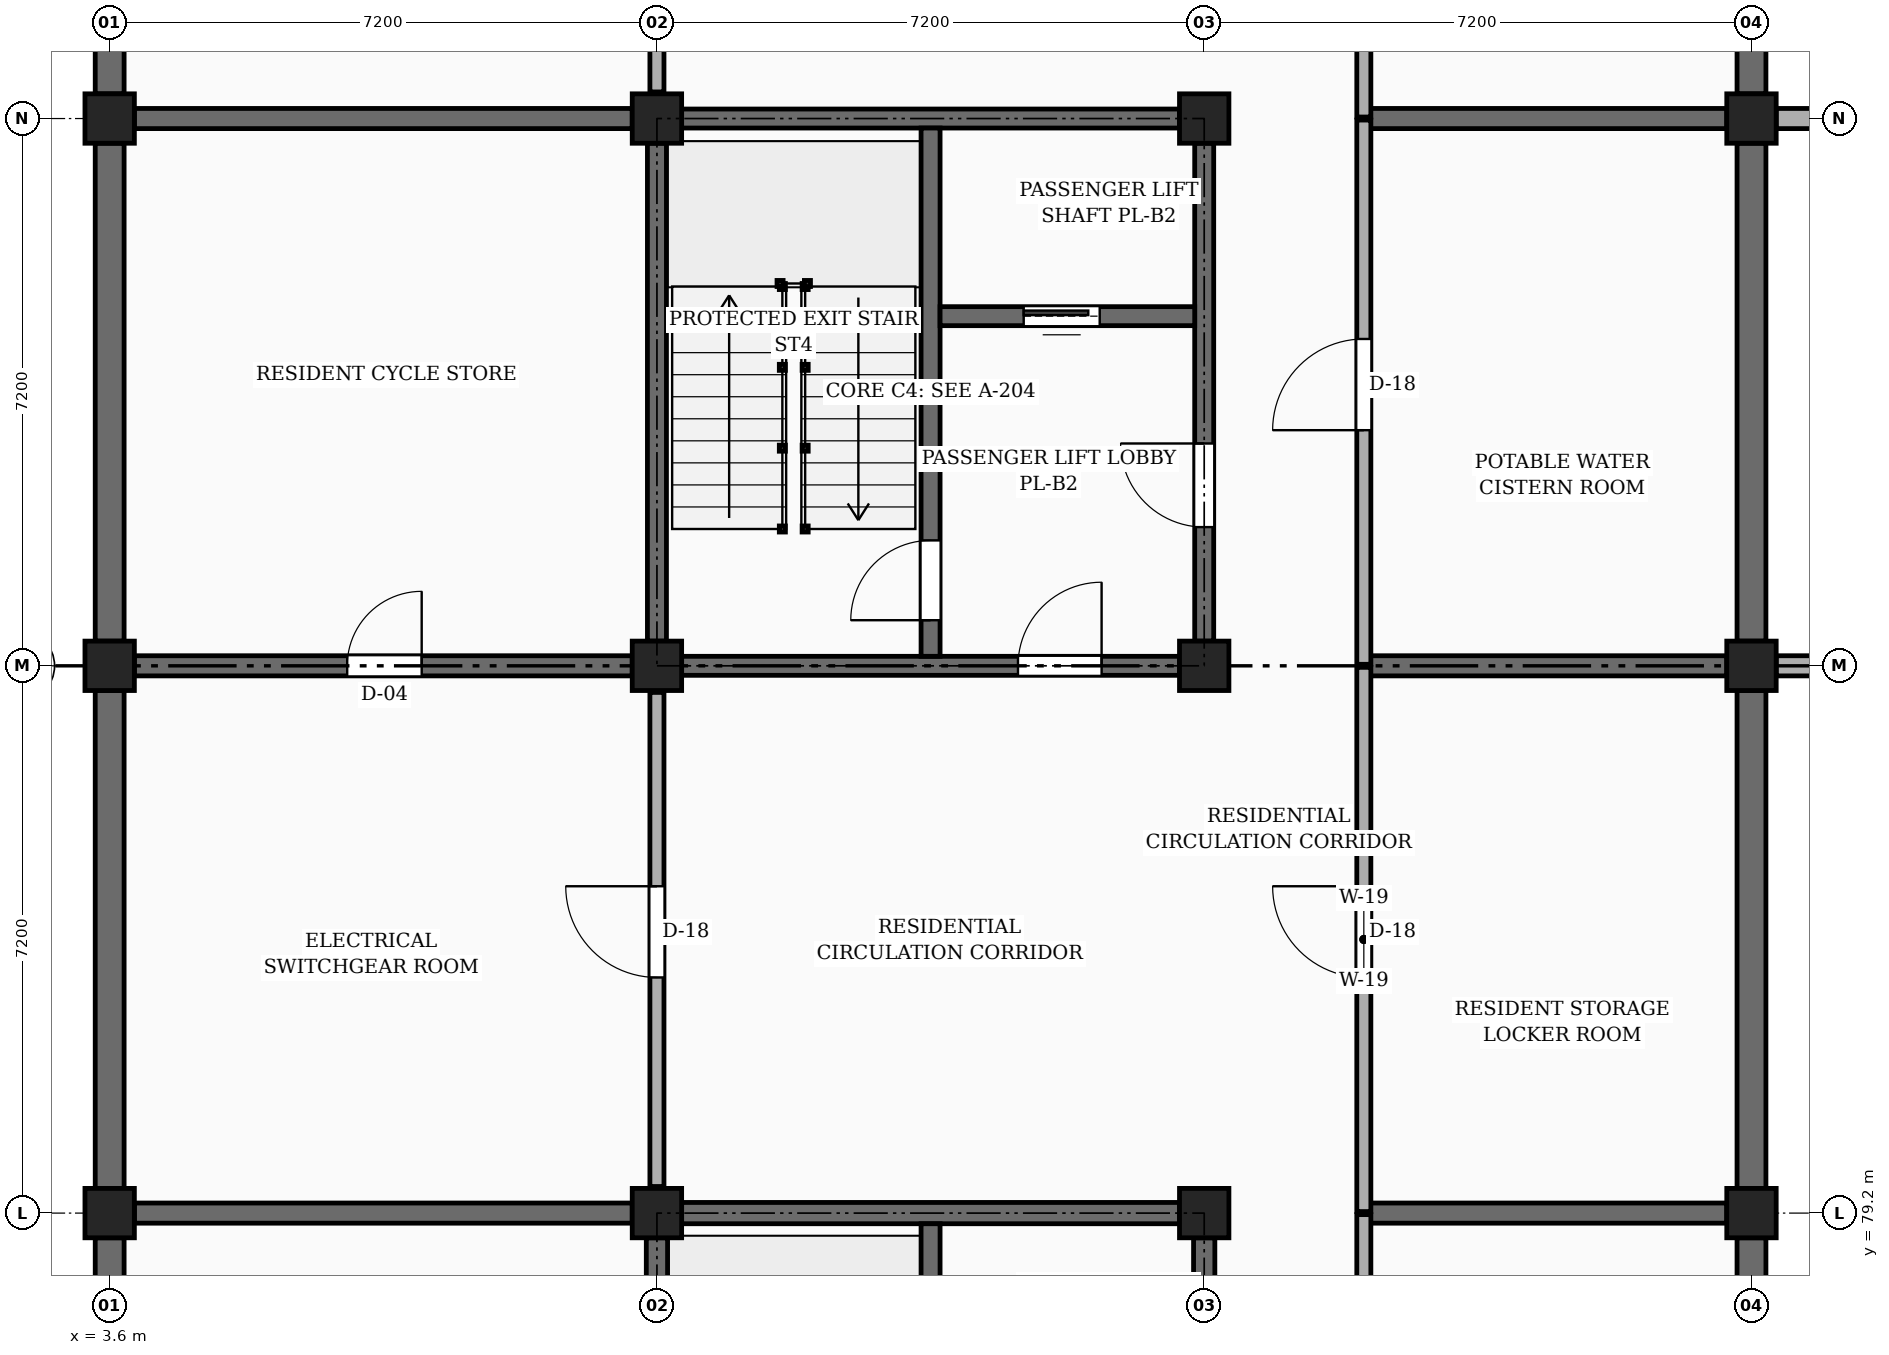
"""IFC4 building model, lengths in metres.
Left out: names, types, materials, properties, quantities, classifications, styles, units other than length and angle.
Written with IfcOpenShell. Run it as: python <this file> out.ifc"""

import sys

from ifc_helpers import new_model, si_unit, direction, frame, frame_2d, origin, origin_2d, place, context, subcontext, project, spatial, rectangle, extrude, element, fill, save


model = new_model("IFC4")
c1 = context("Model", 3, precision=1e-05, world=origin(), true_north=direction((0.0, 1.0)))
c2 = subcontext(c1, "Body", "Model", "MODEL_VIEW")
j1 = project(units=[si_unit("LENGTHUNIT", "METRE"), si_unit("PLANEANGLEUNIT", "RADIAN")], contexts=[c1])
p1 = place(None, origin())
s1 = spatial("IfcSite", under=j1, at=p1, CompositionType="ELEMENT")
p2 = place(p1, origin())
s2 = spatial("IfcBuilding", under=s1, at=p2, CompositionType="ELEMENT")
p3 = place(p2, frame((0.0, 0.0, -4.2)))
s3 = spatial("IfcBuildingStorey", under=s2, at=p3, CompositionType="ELEMENT", Elevation=-4.2)
for number, where, z_axis, x_axis in (
    (1, (25.525, 86.4, 0.0), (0.0, 0.0, 1.0), (1.0, 0.0, 0.0)),
    (2, (27.39, 93.6, 0.0), (0.0, 0.0, 1.0), (-1.0, 0.0, 0.0)),
):
    element("IfcWall", number, at=place(p3, frame(where, z_axis=z_axis, x_axis=x_axis)), inside=s3, PredefinedType="SOLIDWALL", context=c2, shape_type="SweptSolid", body=[
        extrude(rectangle(XDim=1.865, YDim=0.265, at=frame_2d((0.933, 0.0))), origin(), (0.0, 0.0, 1.0), 4.12),
    ])
for number, where, z_axis, x_axis in (
    (3, (3.6, 79.2, 0.0), (0.0, 0.0, 1.0), (1.0, 0.0, 0.0)),
    (4, (3.6, 86.4, 0.0), (0.0, 0.0, 1.0), (1.0, 0.0, 0.0)),
    (5, (3.6, 93.6, 0.0), (0.0, 0.0, 1.0), (1.0, 0.0, 0.0)),
    (6, (10.8, 79.2, 0.0), (0.0, 0.0, 1.0), (1.0, 0.0, 0.0)),
    (7, (10.8, 86.4, 0.0), (0.0, 0.0, 1.0), (1.0, 0.0, 0.0)),
    (8, (10.8, 93.6, 0.0), (0.0, 0.0, 1.0), (1.0, 0.0, 0.0)),
    (9, (18.0, 79.2, 0.0), (0.0, 0.0, 1.0), (1.0, 0.0, 0.0)),
    (10, (18.0, 86.4, 0.0), (0.0, 0.0, 1.0), (1.0, 0.0, 0.0)),
    (11, (18.0, 93.6, 0.0), (0.0, 0.0, 1.0), (1.0, 0.0, 0.0)),
    (12, (25.2, 79.2, 0.0), (0.0, 0.0, 1.0), (1.0, 0.0, 0.0)),
    (13, (25.2, 86.4, 0.0), (0.0, 0.0, 1.0), (1.0, 0.0, 0.0)),
    (14, (25.2, 93.6, 0.0), (0.0, 0.0, 1.0), (1.0, 0.0, 0.0)),
):
    element("IfcColumn", number, at=place(p3, frame(where, z_axis=z_axis, x_axis=x_axis)), inside=s3, PredefinedType="COLUMN", context=c2, shape_type="SweptSolid", body=[
        extrude(rectangle(XDim=0.65, YDim=0.65, at=origin_2d()), origin(), (0.0, 0.0, 1.0), 4.2),
    ])
for number, where, z_axis, x_axis in (
    (15, (25.2, 72.325, 0.0), (0.0, 0.0, 1.0), (0.0, 1.0, 0.0)),
    (16, (3.6, 78.875, 0.0), (0.0, 0.0, 1.0), (0.0, -1.0, 0.0)),
    (17, (25.2, 79.525, 0.0), (0.0, 0.0, 1.0), (0.0, 1.0, 0.0)),
    (18, (3.6, 86.075, 0.0), (0.0, 0.0, 1.0), (0.0, -1.0, 0.0)),
):
    element("IfcWall", number, at=place(p3, frame(where, z_axis=z_axis, x_axis=x_axis)), inside=s3, PredefinedType="USERDEFINED", context=c2, shape_type="SweptSolid", body=[
        extrude(rectangle(XDim=6.55, YDim=0.38, at=frame_2d((3.275, 0.0))), origin(), (0.0, 0.0, 1.0), 3.03),
    ])
for number, where, z_axis, x_axis in (
    (19, (25.2, 86.725, 0.0), (0.0, 0.0, 1.0), (0.0, 1.0, 0.0)),
    (20, (3.6, 93.275, 0.0), (0.0, 0.0, 1.0), (0.0, -1.0, 0.0)),
):
    element("IfcWall", number, at=place(p3, frame(where, z_axis=z_axis, x_axis=x_axis)), inside=s3, PredefinedType="USERDEFINED", context=c2, shape_type="SweptSolid", body=[
        extrude(rectangle(XDim=6.55, YDim=0.38, at=frame_2d((3.275, 0.0))), origin(), (0.0, 0.0, 1.0), 3.03),
    ])
for number, where, z_axis, x_axis in (
    (21, (25.2, 93.925, 0.0), (0.0, 0.0, 1.0), (0.0, 1.0, 0.0)),
    (22, (3.6, 100.475, 0.0), (0.0, 0.0, 1.0), (0.0, -1.0, 0.0)),
):
    element("IfcWall", number, at=place(p3, frame(where, z_axis=z_axis, x_axis=x_axis)), inside=s3, PredefinedType="USERDEFINED", context=c2, shape_type="SweptSolid", body=[
        extrude(rectangle(XDim=6.55, YDim=0.38, at=frame_2d((3.275, 0.0))), origin(), (0.0, 0.0, 1.0), 3.03),
    ])
p4 = place(p3, frame((3.925, 79.2, 0.0), z_axis=(0.0, 0.0, 1.0), x_axis=(1.0, 0.0, 0.0)))
e23 = element("IfcWall", 23, at=p4, inside=s3, PredefinedType="SOLIDWALL", context=c2, shape_type="SweptSolid", body=[
    extrude(rectangle(XDim=6.55, YDim=0.265, at=frame_2d((3.275, 0.0))), origin(), (0.0, 0.0, 1.0), 3.18),
])
p5 = place(p3, frame((20.1, 79.2, 0.0), z_axis=(0.0, 0.0, 1.0), x_axis=(1.0, 0.0, 0.0)))
e24 = element("IfcWall", 24, at=p5, inside=s3, PredefinedType="SOLIDWALL", context=c2, shape_type="SweptSolid", body=[
    extrude(rectangle(XDim=4.775, YDim=0.265, at=frame_2d((2.387, 0.0))), origin(), (0.0, 0.0, 1.0), 3.18),
])
p6 = place(p3, frame((3.925, 86.4, 0.0), z_axis=(0.0, 0.0, 1.0), x_axis=(1.0, 0.0, 0.0)))
e25 = element("IfcWall", 25, at=p6, inside=s3, PredefinedType="SOLIDWALL", context=c2, shape_type="SweptSolid", body=[
    extrude(rectangle(XDim=6.55, YDim=0.265, at=frame_2d((3.275, 0.0))), origin(), (0.0, 0.0, 1.0), 3.18),
])
p7 = place(p6, frame((2.8, 0.0, 0.0)))
e26 = element("IfcOpeningElement", 26, at=p7, cuts=e25, PredefinedType="OPENING", context=c2, shape_type="SweptSolid", body=[
    extrude(rectangle(XDim=0.98, YDim=2.12, at=frame_2d((0.49, 1.06))), frame((0.0, 0.143, 0.0), z_axis=(0.0, -1.0, 0.0), x_axis=(1.0, 0.0, 0.0)), (0.0, 0.0, 1.0), 0.285),
])
p8 = place(p3, frame((20.1, 86.4, 0.0), z_axis=(0.0, 0.0, 1.0), x_axis=(1.0, 0.0, 0.0)))
e27 = element("IfcWall", 27, at=p8, inside=s3, PredefinedType="SOLIDWALL", context=c2, shape_type="SweptSolid", body=[
    extrude(rectangle(XDim=4.775, YDim=0.265, at=frame_2d((2.387, 0.0))), origin(), (0.0, 0.0, 1.0), 3.18),
])
p9 = place(p3, frame((3.925, 93.6, 0.0), z_axis=(0.0, 0.0, 1.0), x_axis=(1.0, 0.0, 0.0)))
e28 = element("IfcWall", 28, at=p9, inside=s3, PredefinedType="SOLIDWALL", context=c2, shape_type="SweptSolid", body=[
    extrude(rectangle(XDim=6.55, YDim=0.265, at=frame_2d((3.275, 0.0))), origin(), (0.0, 0.0, 1.0), 3.18),
])
p10 = place(p3, frame((20.1, 93.6, 0.0), z_axis=(0.0, 0.0, 1.0), x_axis=(1.0, 0.0, 0.0)))
e29 = element("IfcWall", 29, at=p10, inside=s3, PredefinedType="SOLIDWALL", context=c2, shape_type="SweptSolid", body=[
    extrude(rectangle(XDim=4.775, YDim=0.265, at=frame_2d((2.387, 0.0))), origin(), (0.0, 0.0, 1.0), 3.18),
])
for number, where, z_axis, x_axis in (
    (30, (10.8, 72.325, 0.0), (0.0, 0.0, 1.0), (0.0, 1.0, 0.0)),
    (31, (11.125, 79.2, 0.0), (0.0, 0.0, 1.0), (1.0, 0.0, 0.0)),
):
    element("IfcWall", number, at=place(p3, frame(where, z_axis=z_axis, x_axis=x_axis)), inside=s3, PredefinedType="SHEAR", context=c2, shape_type="SweptSolid", body=[
        extrude(rectangle(XDim=6.55, YDim=0.28, at=frame_2d((3.275, 0.0))), origin(), (0.0, 0.0, 1.0), 3.88),
    ])
p11 = place(p3, frame((18.0, 72.325, 0.0), z_axis=(0.0, 0.0, 1.0), x_axis=(0.0, 1.0, 0.0)))
e32 = element("IfcWall", 32, at=p11, inside=s3, PredefinedType="SHEAR", context=c2, shape_type="SweptSolid", body=[
    extrude(rectangle(XDim=6.55, YDim=0.28, at=frame_2d((3.275, 0.0))), origin(), (0.0, 0.0, 1.0), 3.88),
])
p12 = place(p11, frame((1.5, 0.0, 0.0)))
e33 = element("IfcOpeningElement", 33, at=p12, cuts=e32, PredefinedType="OPENING", context=c2, shape_type="SweptSolid", body=[
    extrude(rectangle(XDim=1.1, YDim=2.15, at=frame_2d((0.55, 1.075))), frame((0.0, 0.15, 0.0), z_axis=(0.0, -1.0, 0.0), x_axis=(1.0, 0.0, 0.0)), (0.0, 0.0, 1.0), 0.3),
])
p13 = place(p3, frame((14.4, 72.14, 0.0), z_axis=(0.0, 0.0, 1.0), x_axis=(0.0, 1.0, 0.0)))
e34 = element("IfcWall", 34, at=p13, inside=s3, PredefinedType="SHEAR", context=c2, shape_type="SweptSolid", body=[
    extrude(rectangle(XDim=6.92, YDim=0.25, at=frame_2d((3.46, 0.0))), origin(), (0.0, 0.0, 1.0), 3.88),
])
p14 = place(p13, frame((0.46, 0.0, 0.0)))
e35 = element("IfcOpeningElement", 35, at=p14, cuts=e34, PredefinedType="OPENING", context=c2, shape_type="SweptSolid", body=[
    extrude(rectangle(XDim=1.05, YDim=2.15, at=frame_2d((0.525, 1.075))), frame((0.0, 0.135, 0.0), z_axis=(0.0, -1.0, 0.0), x_axis=(1.0, 0.0, 0.0)), (0.0, 0.0, 1.0), 0.27),
])
p15 = place(p3, frame((10.8, 86.725, 0.0), z_axis=(0.0, 0.0, 1.0), x_axis=(0.0, 1.0, 0.0)))
e36 = element("IfcWall", 36, at=p15, inside=s3, PredefinedType="SHEAR", context=c2, shape_type="SweptSolid", body=[
    extrude(rectangle(XDim=6.55, YDim=0.25, at=frame_2d((3.275, 0.0))), origin(), (0.0, 0.0, 1.0), 3.88),
])
p16 = place(p3, frame((11.125, 93.6, 0.0), z_axis=(0.0, 0.0, 1.0), x_axis=(1.0, 0.0, 0.0)))
e37 = element("IfcWall", 37, at=p16, inside=s3, PredefinedType="SHEAR", context=c2, shape_type="SweptSolid", body=[
    extrude(rectangle(XDim=6.55, YDim=0.25, at=frame_2d((3.275, 0.0))), origin(), (0.0, 0.0, 1.0), 3.88),
])
p17 = place(p3, frame((18.0, 86.725, 0.0), z_axis=(0.0, 0.0, 1.0), x_axis=(0.0, 1.0, 0.0)))
e38 = element("IfcWall", 38, at=p17, inside=s3, PredefinedType="SHEAR", context=c2, shape_type="SweptSolid", body=[
    extrude(rectangle(XDim=6.55, YDim=0.25, at=frame_2d((3.275, 0.0))), origin(), (0.0, 0.0, 1.0), 3.88),
])
p18 = place(p17, frame((1.5, 0.0, 0.0)))
e39 = element("IfcOpeningElement", 39, at=p18, cuts=e38, PredefinedType="OPENING", context=c2, shape_type="SweptSolid", body=[
    extrude(rectangle(XDim=1.1, YDim=2.15, at=frame_2d((0.55, 1.075))), frame((0.0, 0.135, 0.0), z_axis=(0.0, -1.0, 0.0), x_axis=(1.0, 0.0, 0.0)), (0.0, 0.0, 1.0), 0.27),
])
p19 = place(p3, frame((11.125, 86.4, 0.0), z_axis=(0.0, 0.0, 1.0), x_axis=(1.0, 0.0, 0.0)))
e40 = element("IfcWall", 40, at=p19, inside=s3, PredefinedType="SHEAR", context=c2, shape_type="SweptSolid", body=[
    extrude(rectangle(XDim=6.55, YDim=0.25, at=frame_2d((3.275, 0.0))), origin(), (0.0, 0.0, 1.0), 3.88),
])
p20 = place(p19, frame((4.425, 0.0, 0.0)))
e41 = element("IfcOpeningElement", 41, at=p20, cuts=e40, PredefinedType="OPENING", context=c2, shape_type="SweptSolid", body=[
    extrude(rectangle(XDim=1.1, YDim=2.15, at=frame_2d((0.55, 1.075))), frame((0.0, 0.135, 0.0), z_axis=(0.0, -1.0, 0.0), x_axis=(1.0, 0.0, 0.0)), (0.0, 0.0, 1.0), 0.27),
])
p21 = place(p3, frame((14.4, 86.525, 0.0), z_axis=(0.0, 0.0, 1.0), x_axis=(0.0, 1.0, 0.0)))
e42 = element("IfcWall", 42, at=p21, inside=s3, PredefinedType="SHEAR", context=c2, shape_type="SweptSolid", body=[
    extrude(rectangle(XDim=6.95, YDim=0.25, at=frame_2d((3.475, 0.0))), origin(), (0.0, 0.0, 1.0), 3.88),
])
p22 = place(p21, frame((0.475, 0.0, 0.0)))
e43 = element("IfcOpeningElement", 43, at=p22, cuts=e42, PredefinedType="OPENING", context=c2, shape_type="SweptSolid", body=[
    extrude(rectangle(XDim=1.05, YDim=2.15, at=frame_2d((0.525, 1.075))), frame((0.0, 0.135, 0.0), z_axis=(0.0, -1.0, 0.0), x_axis=(1.0, 0.0, 0.0)), (0.0, 0.0, 1.0), 0.27),
])
p23 = place(p3, frame((14.525, 91.0, 0.0), z_axis=(0.0, 0.0, 1.0), x_axis=(1.0, 0.0, 0.0)))
e44 = element("IfcWall", 44, at=p23, inside=s3, PredefinedType="SHEAR", context=c2, shape_type="SweptSolid", body=[
    extrude(rectangle(XDim=3.35, YDim=0.25, at=frame_2d((1.675, 0.0))), origin(), (0.0, 0.0, 1.0), 3.88),
])
p24 = place(p23, frame((1.1, 0.0, 0.0)))
e45 = element("IfcOpeningElement", 45, at=p24, cuts=e44, PredefinedType="OPENING", context=c2, shape_type="SweptSolid", body=[
    extrude(rectangle(XDim=1.0, YDim=2.2, at=frame_2d((0.5, 1.1))), frame((0.0, 0.135, 0.0), z_axis=(0.0, -1.0, 0.0), x_axis=(1.0, 0.0, 0.0)), (0.0, 0.0, 1.0), 0.27),
])
p25 = place(p3, frame((20.1, 72.02, 0.0), z_axis=(0.0, 0.0, 1.0), x_axis=(0.0, 1.0, 0.0)))
e46 = element("IfcWall", 46, at=p25, inside=s3, PredefinedType="PARTITIONING", context=c2, shape_type="SweptSolid", body=[
    extrude(rectangle(XDim=7.16, YDim=0.185, at=frame_2d((3.58, 0.0))), origin(), (0.0, 0.0, 1.0), 3.315),
])
p26 = place(p25, frame((3.08, 0.0, 0.0)))
e47 = element("IfcOpeningElement", 47, at=p26, cuts=e46, PredefinedType="OPENING", context=c2, shape_type="SweptSolid", body=[
    extrude(rectangle(XDim=1.2, YDim=2.2, at=frame_2d((0.6, 1.1))), frame((0.0, 0.103, 0.0), z_axis=(0.0, -1.0, 0.0), x_axis=(1.0, 0.0, 0.0)), (0.0, 0.0, 1.0), 0.205),
])
p27 = place(p3, frame((20.1, 79.22, 0.0), z_axis=(0.0, 0.0, 1.0), x_axis=(0.0, 1.0, 0.0)))
e48 = element("IfcWall", 48, at=p27, inside=s3, PredefinedType="PARTITIONING", context=c2, shape_type="SweptSolid", body=[
    extrude(rectangle(XDim=7.16, YDim=0.185, at=frame_2d((3.58, 0.0))), origin(), (0.0, 0.0, 1.0), 3.315),
])
p28 = place(p27, frame((3.08, 0.0, 0.0)))
e49 = element("IfcOpeningElement", 49, at=p28, cuts=e48, PredefinedType="OPENING", context=c2, shape_type="SweptSolid", body=[
    extrude(rectangle(XDim=1.2, YDim=2.2, at=frame_2d((0.6, 1.1))), frame((0.0, 0.103, 0.0), z_axis=(0.0, -1.0, 0.0), x_axis=(1.0, 0.0, 0.0)), (0.0, 0.0, 1.0), 0.205),
])
p29 = place(p3, frame((20.1, 86.42, 0.0), z_axis=(0.0, 0.0, 1.0), x_axis=(0.0, 1.0, 0.0)))
e50 = element("IfcWall", 50, at=p29, inside=s3, PredefinedType="PARTITIONING", context=c2, shape_type="SweptSolid", body=[
    extrude(rectangle(XDim=7.16, YDim=0.185, at=frame_2d((3.58, 0.0))), origin(), (0.0, 0.0, 1.0), 3.315),
])
p30 = place(p29, frame((3.08, 0.0, 0.0)))
e51 = element("IfcOpeningElement", 51, at=p30, cuts=e50, PredefinedType="OPENING", context=c2, shape_type="SweptSolid", body=[
    extrude(rectangle(XDim=1.2, YDim=2.2, at=frame_2d((0.6, 1.1))), frame((0.0, 0.103, 0.0), z_axis=(0.0, -1.0, 0.0), x_axis=(1.0, 0.0, 0.0)), (0.0, 0.0, 1.0), 0.205),
])
p31 = place(p3, frame((20.1, 93.62, 0.0), z_axis=(0.0, 0.0, 1.0), x_axis=(0.0, 1.0, 0.0)))
e52 = element("IfcWall", 52, at=p31, inside=s3, PredefinedType="PARTITIONING", context=c2, shape_type="SweptSolid", body=[
    extrude(rectangle(XDim=6.965, YDim=0.185, at=frame_2d((3.482, 0.0))), origin(), (0.0, 0.0, 1.0), 3.315),
])
p32 = place(p31, frame((3.08, 0.0, 0.0)))
e53 = element("IfcOpeningElement", 53, at=p32, cuts=e52, PredefinedType="OPENING", context=c2, shape_type="SweptSolid", body=[
    extrude(rectangle(XDim=1.2, YDim=2.2, at=frame_2d((0.6, 1.1))), frame((0.0, 0.103, 0.0), z_axis=(0.0, -1.0, 0.0), x_axis=(1.0, 0.0, 0.0)), (0.0, 0.0, 1.0), 0.205),
])
p33 = place(p3, frame((10.8, 79.55, 0.0), z_axis=(0.0, 0.0, 1.0), x_axis=(0.0, 1.0, 0.0)))
e54 = element("IfcWall", 54, at=p33, inside=s3, PredefinedType="PARTITIONING", context=c2, shape_type="SweptSolid", body=[
    extrude(rectangle(XDim=6.5, YDim=0.185, at=frame_2d((3.25, 0.0))), origin(), (0.0, 0.0, 1.0), 3.08),
])
p34 = place(p33, frame((2.75, 0.0, 0.0)))
e55 = element("IfcOpeningElement", 55, at=p34, cuts=e54, PredefinedType="OPENING", context=c2, shape_type="SweptSolid", body=[
    extrude(rectangle(XDim=1.2, YDim=2.2, at=frame_2d((0.6, 1.1))), frame((0.0, 0.103, 0.0), z_axis=(0.0, -1.0, 0.0), x_axis=(1.0, 0.0, 0.0)), (0.0, 0.0, 1.0), 0.205),
])
p35 = place(p3, frame((10.8, 93.95, 0.0), z_axis=(0.0, 0.0, 1.0), x_axis=(0.0, 1.0, 0.0)))
e56 = element("IfcWall", 56, at=p35, inside=s3, PredefinedType="PARTITIONING", context=c2, shape_type="SweptSolid", body=[
    extrude(rectangle(XDim=6.5, YDim=0.185, at=frame_2d((3.25, 0.0))), origin(), (0.0, 0.0, 1.0), 3.08),
])
p36 = place(p35, frame((2.75, 0.0, 0.0)))
e57 = element("IfcOpeningElement", 57, at=p36, cuts=e56, PredefinedType="OPENING", context=c2, shape_type="SweptSolid", body=[
    extrude(rectangle(XDim=1.2, YDim=2.2, at=frame_2d((0.6, 1.1))), frame((0.0, 0.103, 0.0), z_axis=(0.0, -1.0, 0.0), x_axis=(1.0, 0.0, 0.0)), (0.0, 0.0, 1.0), 0.205),
])
p37 = place(p18, frame((1.1, 0.0, 0.0), z_axis=(0.0, 0.0, 1.0), x_axis=(-1.0, 0.0, 0.0)))
e58 = element("IfcDoor", 58, at=p37, inside=s3, OperationType="SINGLE_SWING_RIGHT", PredefinedType="DOOR", context=c2, shape_type="SweptSolid", body=[
    extrude(rectangle(XDim=1.1, YDim=2.15, at=frame_2d((0.55, 1.075))), frame((0.0, 0.025, 0.0), z_axis=(0.0, -1.0, 0.0), x_axis=(1.0, 0.0, 0.0)), (0.0, 0.0, 1.0), 0.05),
])
fill(e39, e58)
p38 = place(p20, frame((1.1, 0.0, 0.0), z_axis=(0.0, 0.0, 1.0), x_axis=(-1.0, 0.0, 0.0)))
e59 = element("IfcDoor", 59, at=p38, inside=s3, OperationType="SINGLE_SWING_RIGHT", PredefinedType="DOOR", context=c2, shape_type="SweptSolid", body=[
    extrude(rectangle(XDim=1.1, YDim=2.15, at=frame_2d((0.55, 1.075))), frame((0.0, 0.025, 0.0), z_axis=(0.0, -1.0, 0.0), x_axis=(1.0, 0.0, 0.0)), (0.0, 0.0, 1.0), 0.05),
])
fill(e41, e59)
p39 = place(p22, origin())
e60 = element("IfcDoor", 60, at=p39, inside=s3, OperationType="SINGLE_SWING_LEFT", PredefinedType="DOOR", context=c2, shape_type="SweptSolid", body=[
    extrude(rectangle(XDim=1.05, YDim=2.15, at=frame_2d((0.525, 1.075))), frame((0.0, 0.025, 0.0), z_axis=(0.0, -1.0, 0.0), x_axis=(1.0, 0.0, 0.0)), (0.0, 0.0, 1.0), 0.05),
])
fill(e43, e60)
p40 = place(p24, origin())
e61 = element("IfcDoor", 61, at=p40, inside=s3, OperationType="SLIDING_TO_LEFT", PredefinedType="DOOR", context=c2, shape_type="SweptSolid", body=[
    extrude(rectangle(XDim=1.0, YDim=2.2, at=frame_2d((0.5, 1.1))), frame((0.0, 0.025, 0.0), z_axis=(0.0, -1.0, 0.0), x_axis=(1.0, 0.0, 0.0)), (0.0, 0.0, 1.0), 0.05),
])
fill(e45, e61)
p41 = place(p28, origin())
e62 = element("IfcDoor", 62, at=p41, inside=s3, OperationType="SINGLE_SWING_RIGHT", PredefinedType="DOOR", context=c2, shape_type="SweptSolid", body=[
    extrude(rectangle(XDim=1.2, YDim=2.2, at=frame_2d((0.6, 1.1))), frame((0.0, 0.025, 0.0), z_axis=(0.0, -1.0, 0.0), x_axis=(1.0, 0.0, 0.0)), (0.0, 0.0, 1.0), 0.05),
])
fill(e49, e62)
p42 = place(p30, origin())
e63 = element("IfcDoor", 63, at=p42, inside=s3, OperationType="SINGLE_SWING_LEFT", PredefinedType="DOOR", context=c2, shape_type="SweptSolid", body=[
    extrude(rectangle(XDim=1.2, YDim=2.2, at=frame_2d((0.6, 1.1))), frame((0.0, 0.025, 0.0), z_axis=(0.0, -1.0, 0.0), x_axis=(1.0, 0.0, 0.0)), (0.0, 0.0, 1.0), 0.05),
])
fill(e51, e63)
p43 = place(p34, origin())
e64 = element("IfcDoor", 64, at=p43, inside=s3, OperationType="SINGLE_SWING_RIGHT", PredefinedType="DOOR", context=c2, shape_type="SweptSolid", body=[
    extrude(rectangle(XDim=1.2, YDim=2.2, at=frame_2d((0.6, 1.1))), frame((0.0, 0.025, 0.0), z_axis=(0.0, -1.0, 0.0), x_axis=(1.0, 0.0, 0.0)), (0.0, 0.0, 1.0), 0.05),
])
fill(e55, e64)
p44 = place(p7, origin())
e65 = element("IfcDoor", 65, at=p44, inside=s3, OperationType="SINGLE_SWING_RIGHT", PredefinedType="DOOR", context=c2, shape_type="SweptSolid", body=[
    extrude(rectangle(XDim=0.98, YDim=2.12, at=frame_2d((0.49, 1.06))), frame((0.0, 0.025, 0.0), z_axis=(0.0, -1.0, 0.0), x_axis=(1.0, 0.0, 0.0)), (0.0, 0.0, 1.0), 0.05),
])
fill(e26, e65)
save(model, sys.argv[1])
